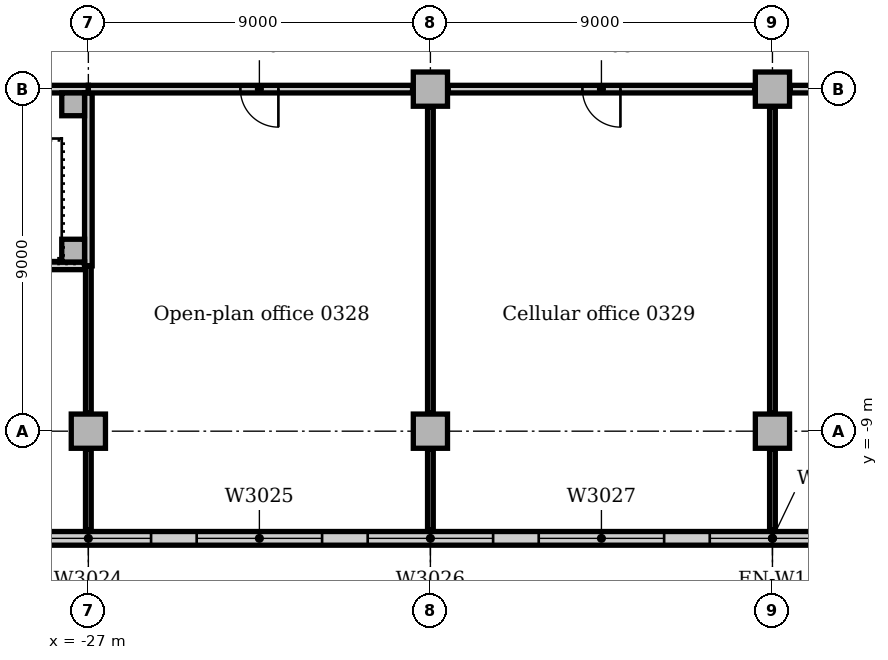
"""IFC4 building model, lengths in metres.
Left out: names, types, materials, properties, quantities, classifications, styles, units other than length and angle.
Written with IfcOpenShell. Run it as: python <this file> out.ifc"""

import sys

from ifc_helpers import new_model, si_unit, direction, frame, frame_2d, origin, origin_2d, place, context, subcontext, project, spatial, rectangle, extrude, element, fill, save


model = new_model("IFC4")
c1 = context("Model", 3, precision=1e-05, world=origin(), true_north=direction((0.0, 1.0)))
c2 = subcontext(c1, "Body", "Model", "MODEL_VIEW")
j1 = project(units=[si_unit("LENGTHUNIT", "METRE"), si_unit("PLANEANGLEUNIT", "RADIAN")], contexts=[c1])
p1 = place(None, origin())
s1 = spatial("IfcSite", under=j1, at=p1, CompositionType="ELEMENT")
p2 = place(p1, origin())
s2 = spatial("IfcBuilding", under=s1, at=p2, CompositionType="ELEMENT")
p3 = place(p2, frame((0.0, 0.0, 16.0)))
s3 = spatial("IfcBuildingStorey", under=s2, at=p3, CompositionType="ELEMENT", Elevation=16.0)
for number, where, z_axis, x_axis in (
    (1, (-27.0, -9.0, 0.0), (0.0, 0.0, 1.0), (1.0, 0.0, 0.0)),
    (2, (-18.0, -9.0, 0.0), (0.0, 0.0, 1.0), (1.0, 0.0, 0.0)),
    (3, (-18.0, 0.0, 0.0), (0.0, 0.0, 1.0), (1.0, 0.0, 0.0)),
    (4, (-9.0, -9.0, 0.0), (0.0, 0.0, 1.0), (1.0, 0.0, 0.0)),
    (5, (-9.0, 0.0, 0.0), (0.0, 0.0, 1.0), (1.0, 0.0, 0.0)),
):
    element("IfcColumn", number, at=place(p3, frame(where, z_axis=z_axis, x_axis=x_axis)), inside=s3, PredefinedType="COLUMN", context=c2, shape_type="SweptSolid", body=[
        extrude(rectangle(XDim=0.9, YDim=0.9, at=origin_2d()), origin(), (0.0, 0.0, 1.0), 4.7),
    ])
p4 = place(p3, frame((-81.0, -11.82, 0.0), z_axis=(0.0, 0.0, 1.0), x_axis=(1.0, 0.0, 0.0)))
e6 = element("IfcWall", 6, at=p4, inside=s3, PredefinedType="STANDARD", context=c2, shape_type="SweptSolid", body=[
    extrude(rectangle(XDim=144.0, YDim=0.36, at=frame_2d((72.0, 0.0))), origin(), (0.0, 0.0, 1.0), 4.7),
])
p5 = place(p4, frame((2.85, 0.0, 0.9)))
e7 = element("IfcOpeningElement", 7, at=p5, cuts=e6, PredefinedType="OPENING", context=c2, shape_type="SweptSolid", body=[
    extrude(rectangle(XDim=3.3, YDim=2.4, at=frame_2d((1.65, 1.2))), frame((0.0, 0.19, 0.0), z_axis=(0.0, -1.0, 0.0), x_axis=(1.0, 0.0, 0.0)), (0.0, 0.0, 1.0), 0.38),
])
p6 = place(p4, frame((7.35, 0.0, 0.9)))
e8 = element("IfcOpeningElement", 8, at=p6, cuts=e6, PredefinedType="OPENING", context=c2, shape_type="SweptSolid", body=[
    extrude(rectangle(XDim=3.3, YDim=2.4, at=frame_2d((1.65, 1.2))), frame((0.0, 0.19, 0.0), z_axis=(0.0, -1.0, 0.0), x_axis=(1.0, 0.0, 0.0)), (0.0, 0.0, 1.0), 0.38),
])
p7 = place(p4, frame((11.85, 0.0, 0.9)))
e9 = element("IfcOpeningElement", 9, at=p7, cuts=e6, PredefinedType="OPENING", context=c2, shape_type="SweptSolid", body=[
    extrude(rectangle(XDim=3.3, YDim=2.4, at=frame_2d((1.65, 1.2))), frame((0.0, 0.19, 0.0), z_axis=(0.0, -1.0, 0.0), x_axis=(1.0, 0.0, 0.0)), (0.0, 0.0, 1.0), 0.38),
])
p8 = place(p4, frame((16.35, 0.0, 0.9)))
e10 = element("IfcOpeningElement", 10, at=p8, cuts=e6, PredefinedType="OPENING", context=c2, shape_type="SweptSolid", body=[
    extrude(rectangle(XDim=3.3, YDim=2.4, at=frame_2d((1.65, 1.2))), frame((0.0, 0.19, 0.0), z_axis=(0.0, -1.0, 0.0), x_axis=(1.0, 0.0, 0.0)), (0.0, 0.0, 1.0), 0.38),
])
p9 = place(p4, frame((20.85, 0.0, 0.9)))
e11 = element("IfcOpeningElement", 11, at=p9, cuts=e6, PredefinedType="OPENING", context=c2, shape_type="SweptSolid", body=[
    extrude(rectangle(XDim=3.3, YDim=2.4, at=frame_2d((1.65, 1.2))), frame((0.0, 0.19, 0.0), z_axis=(0.0, -1.0, 0.0), x_axis=(1.0, 0.0, 0.0)), (0.0, 0.0, 1.0), 0.38),
])
p10 = place(p4, frame((25.35, 0.0, 0.9)))
e12 = element("IfcOpeningElement", 12, at=p10, cuts=e6, PredefinedType="OPENING", context=c2, shape_type="SweptSolid", body=[
    extrude(rectangle(XDim=3.3, YDim=2.4, at=frame_2d((1.65, 1.2))), frame((0.0, 0.19, 0.0), z_axis=(0.0, -1.0, 0.0), x_axis=(1.0, 0.0, 0.0)), (0.0, 0.0, 1.0), 0.38),
])
p11 = place(p4, frame((29.85, 0.0, 0.9)))
e13 = element("IfcOpeningElement", 13, at=p11, cuts=e6, PredefinedType="OPENING", context=c2, shape_type="SweptSolid", body=[
    extrude(rectangle(XDim=3.3, YDim=2.4, at=frame_2d((1.65, 1.2))), frame((0.0, 0.19, 0.0), z_axis=(0.0, -1.0, 0.0), x_axis=(1.0, 0.0, 0.0)), (0.0, 0.0, 1.0), 0.38),
])
p12 = place(p4, frame((34.35, 0.0, 0.9)))
e14 = element("IfcOpeningElement", 14, at=p12, cuts=e6, PredefinedType="OPENING", context=c2, shape_type="SweptSolid", body=[
    extrude(rectangle(XDim=3.3, YDim=2.4, at=frame_2d((1.65, 1.2))), frame((0.0, 0.19, 0.0), z_axis=(0.0, -1.0, 0.0), x_axis=(1.0, 0.0, 0.0)), (0.0, 0.0, 1.0), 0.38),
])
p13 = place(p4, frame((38.85, 0.0, 0.9)))
e15 = element("IfcOpeningElement", 15, at=p13, cuts=e6, PredefinedType="OPENING", context=c2, shape_type="SweptSolid", body=[
    extrude(rectangle(XDim=3.3, YDim=2.4, at=frame_2d((1.65, 1.2))), frame((0.0, 0.19, 0.0), z_axis=(0.0, -1.0, 0.0), x_axis=(1.0, 0.0, 0.0)), (0.0, 0.0, 1.0), 0.38),
])
p14 = place(p4, frame((43.35, 0.0, 0.9)))
e16 = element("IfcOpeningElement", 16, at=p14, cuts=e6, PredefinedType="OPENING", context=c2, shape_type="SweptSolid", body=[
    extrude(rectangle(XDim=3.3, YDim=2.4, at=frame_2d((1.65, 1.2))), frame((0.0, 0.19, 0.0), z_axis=(0.0, -1.0, 0.0), x_axis=(1.0, 0.0, 0.0)), (0.0, 0.0, 1.0), 0.38),
])
p15 = place(p4, frame((47.85, 0.0, 0.9)))
e17 = element("IfcOpeningElement", 17, at=p15, cuts=e6, PredefinedType="OPENING", context=c2, shape_type="SweptSolid", body=[
    extrude(rectangle(XDim=3.3, YDim=2.4, at=frame_2d((1.65, 1.2))), frame((0.0, 0.19, 0.0), z_axis=(0.0, -1.0, 0.0), x_axis=(1.0, 0.0, 0.0)), (0.0, 0.0, 1.0), 0.38),
])
p16 = place(p4, frame((52.35, 0.0, 0.9)))
e18 = element("IfcOpeningElement", 18, at=p16, cuts=e6, PredefinedType="OPENING", context=c2, shape_type="SweptSolid", body=[
    extrude(rectangle(XDim=3.3, YDim=2.4, at=frame_2d((1.65, 1.2))), frame((0.0, 0.19, 0.0), z_axis=(0.0, -1.0, 0.0), x_axis=(1.0, 0.0, 0.0)), (0.0, 0.0, 1.0), 0.38),
])
p17 = place(p4, frame((56.85, 0.0, 0.9)))
e19 = element("IfcOpeningElement", 19, at=p17, cuts=e6, PredefinedType="OPENING", context=c2, shape_type="SweptSolid", body=[
    extrude(rectangle(XDim=3.3, YDim=2.4, at=frame_2d((1.65, 1.2))), frame((0.0, 0.19, 0.0), z_axis=(0.0, -1.0, 0.0), x_axis=(1.0, 0.0, 0.0)), (0.0, 0.0, 1.0), 0.38),
])
p18 = place(p4, frame((61.35, 0.0, 0.9)))
e20 = element("IfcOpeningElement", 20, at=p18, cuts=e6, PredefinedType="OPENING", context=c2, shape_type="SweptSolid", body=[
    extrude(rectangle(XDim=3.3, YDim=2.4, at=frame_2d((1.65, 1.2))), frame((0.0, 0.19, 0.0), z_axis=(0.0, -1.0, 0.0), x_axis=(1.0, 0.0, 0.0)), (0.0, 0.0, 1.0), 0.38),
])
p19 = place(p4, frame((65.85, 0.0, 0.9)))
e21 = element("IfcOpeningElement", 21, at=p19, cuts=e6, PredefinedType="OPENING", context=c2, shape_type="SweptSolid", body=[
    extrude(rectangle(XDim=3.3, YDim=2.4, at=frame_2d((1.65, 1.2))), frame((0.0, 0.19, 0.0), z_axis=(0.0, -1.0, 0.0), x_axis=(1.0, 0.0, 0.0)), (0.0, 0.0, 1.0), 0.38),
])
p20 = place(p4, frame((70.35, 0.0, 0.9)))
e22 = element("IfcOpeningElement", 22, at=p20, cuts=e6, PredefinedType="OPENING", context=c2, shape_type="SweptSolid", body=[
    extrude(rectangle(XDim=3.3, YDim=2.4, at=frame_2d((1.65, 1.2))), frame((0.0, 0.19, 0.0), z_axis=(0.0, -1.0, 0.0), x_axis=(1.0, 0.0, 0.0)), (0.0, 0.0, 1.0), 0.38),
])
p21 = place(p4, frame((74.85, 0.0, 0.9)))
e23 = element("IfcOpeningElement", 23, at=p21, cuts=e6, PredefinedType="OPENING", context=c2, shape_type="SweptSolid", body=[
    extrude(rectangle(XDim=3.3, YDim=2.4, at=frame_2d((1.65, 1.2))), frame((0.0, 0.19, 0.0), z_axis=(0.0, -1.0, 0.0), x_axis=(1.0, 0.0, 0.0)), (0.0, 0.0, 1.0), 0.38),
])
p22 = place(p4, frame((79.35, 0.0, 0.9)))
e24 = element("IfcOpeningElement", 24, at=p22, cuts=e6, PredefinedType="OPENING", context=c2, shape_type="SweptSolid", body=[
    extrude(rectangle(XDim=3.3, YDim=2.4, at=frame_2d((1.65, 1.2))), frame((0.0, 0.19, 0.0), z_axis=(0.0, -1.0, 0.0), x_axis=(1.0, 0.0, 0.0)), (0.0, 0.0, 1.0), 0.38),
])
p23 = place(p4, frame((83.85, 0.0, 0.9)))
e25 = element("IfcOpeningElement", 25, at=p23, cuts=e6, PredefinedType="OPENING", context=c2, shape_type="SweptSolid", body=[
    extrude(rectangle(XDim=3.3, YDim=2.4, at=frame_2d((1.65, 1.2))), frame((0.0, 0.19, 0.0), z_axis=(0.0, -1.0, 0.0), x_axis=(1.0, 0.0, 0.0)), (0.0, 0.0, 1.0), 0.38),
])
p24 = place(p4, frame((88.35, 0.0, 0.9)))
e26 = element("IfcOpeningElement", 26, at=p24, cuts=e6, PredefinedType="OPENING", context=c2, shape_type="SweptSolid", body=[
    extrude(rectangle(XDim=3.3, YDim=2.4, at=frame_2d((1.65, 1.2))), frame((0.0, 0.19, 0.0), z_axis=(0.0, -1.0, 0.0), x_axis=(1.0, 0.0, 0.0)), (0.0, 0.0, 1.0), 0.38),
])
p25 = place(p4, frame((92.85, 0.0, 0.9)))
e27 = element("IfcOpeningElement", 27, at=p25, cuts=e6, PredefinedType="OPENING", context=c2, shape_type="SweptSolid", body=[
    extrude(rectangle(XDim=3.3, YDim=2.4, at=frame_2d((1.65, 1.2))), frame((0.0, 0.19, 0.0), z_axis=(0.0, -1.0, 0.0), x_axis=(1.0, 0.0, 0.0)), (0.0, 0.0, 1.0), 0.38),
])
p26 = place(p4, frame((97.35, 0.0, 0.9)))
e28 = element("IfcOpeningElement", 28, at=p26, cuts=e6, PredefinedType="OPENING", context=c2, shape_type="SweptSolid", body=[
    extrude(rectangle(XDim=3.3, YDim=2.4, at=frame_2d((1.65, 1.2))), frame((0.0, 0.19, 0.0), z_axis=(0.0, -1.0, 0.0), x_axis=(1.0, 0.0, 0.0)), (0.0, 0.0, 1.0), 0.38),
])
p27 = place(p4, frame((101.85, 0.0, 0.9)))
e29 = element("IfcOpeningElement", 29, at=p27, cuts=e6, PredefinedType="OPENING", context=c2, shape_type="SweptSolid", body=[
    extrude(rectangle(XDim=3.3, YDim=2.4, at=frame_2d((1.65, 1.2))), frame((0.0, 0.19, 0.0), z_axis=(0.0, -1.0, 0.0), x_axis=(1.0, 0.0, 0.0)), (0.0, 0.0, 1.0), 0.38),
])
p28 = place(p4, frame((106.35, 0.0, 0.9)))
e30 = element("IfcOpeningElement", 30, at=p28, cuts=e6, PredefinedType="OPENING", context=c2, shape_type="SweptSolid", body=[
    extrude(rectangle(XDim=3.3, YDim=2.4, at=frame_2d((1.65, 1.2))), frame((0.0, 0.19, 0.0), z_axis=(0.0, -1.0, 0.0), x_axis=(1.0, 0.0, 0.0)), (0.0, 0.0, 1.0), 0.38),
])
p29 = place(p4, frame((110.85, 0.0, 0.9)))
e31 = element("IfcOpeningElement", 31, at=p29, cuts=e6, PredefinedType="OPENING", context=c2, shape_type="SweptSolid", body=[
    extrude(rectangle(XDim=3.3, YDim=2.4, at=frame_2d((1.65, 1.2))), frame((0.0, 0.19, 0.0), z_axis=(0.0, -1.0, 0.0), x_axis=(1.0, 0.0, 0.0)), (0.0, 0.0, 1.0), 0.38),
])
p30 = place(p4, frame((115.35, 0.0, 0.9)))
e32 = element("IfcOpeningElement", 32, at=p30, cuts=e6, PredefinedType="OPENING", context=c2, shape_type="SweptSolid", body=[
    extrude(rectangle(XDim=3.3, YDim=2.4, at=frame_2d((1.65, 1.2))), frame((0.0, 0.19, 0.0), z_axis=(0.0, -1.0, 0.0), x_axis=(1.0, 0.0, 0.0)), (0.0, 0.0, 1.0), 0.38),
])
p31 = place(p4, frame((119.85, 0.0, 0.9)))
e33 = element("IfcOpeningElement", 33, at=p31, cuts=e6, PredefinedType="OPENING", context=c2, shape_type="SweptSolid", body=[
    extrude(rectangle(XDim=3.3, YDim=2.4, at=frame_2d((1.65, 1.2))), frame((0.0, 0.19, 0.0), z_axis=(0.0, -1.0, 0.0), x_axis=(1.0, 0.0, 0.0)), (0.0, 0.0, 1.0), 0.38),
])
p32 = place(p4, frame((124.35, 0.0, 0.9)))
e34 = element("IfcOpeningElement", 34, at=p32, cuts=e6, PredefinedType="OPENING", context=c2, shape_type="SweptSolid", body=[
    extrude(rectangle(XDim=3.3, YDim=2.4, at=frame_2d((1.65, 1.2))), frame((0.0, 0.19, 0.0), z_axis=(0.0, -1.0, 0.0), x_axis=(1.0, 0.0, 0.0)), (0.0, 0.0, 1.0), 0.38),
])
p33 = place(p4, frame((128.85, 0.0, 0.9)))
e35 = element("IfcOpeningElement", 35, at=p33, cuts=e6, PredefinedType="OPENING", context=c2, shape_type="SweptSolid", body=[
    extrude(rectangle(XDim=3.3, YDim=2.4, at=frame_2d((1.65, 1.2))), frame((0.0, 0.19, 0.0), z_axis=(0.0, -1.0, 0.0), x_axis=(1.0, 0.0, 0.0)), (0.0, 0.0, 1.0), 0.38),
])
p34 = place(p4, frame((133.35, 0.0, 0.9)))
e36 = element("IfcOpeningElement", 36, at=p34, cuts=e6, PredefinedType="OPENING", context=c2, shape_type="SweptSolid", body=[
    extrude(rectangle(XDim=3.3, YDim=2.4, at=frame_2d((1.65, 1.2))), frame((0.0, 0.19, 0.0), z_axis=(0.0, -1.0, 0.0), x_axis=(1.0, 0.0, 0.0)), (0.0, 0.0, 1.0), 0.38),
])
p35 = place(p4, frame((137.85, 0.0, 0.9)))
e37 = element("IfcOpeningElement", 37, at=p35, cuts=e6, PredefinedType="OPENING", context=c2, shape_type="SweptSolid", body=[
    extrude(rectangle(XDim=3.3, YDim=2.4, at=frame_2d((1.65, 1.2))), frame((0.0, 0.19, 0.0), z_axis=(0.0, -1.0, 0.0), x_axis=(1.0, 0.0, 0.0)), (0.0, 0.0, 1.0), 0.38),
])
for number, where, z_axis, x_axis in (
    (38, (-27.4, -4.25, 0.0), (0.0, 0.0, 1.0), (1.0, 0.0, 0.0)),
    (39, (-27.4, -0.4, 0.0), (0.0, 0.0, 1.0), (1.0, 0.0, 0.0)),
):
    element("IfcColumn", number, at=place(p3, frame(where, z_axis=z_axis, x_axis=x_axis)), inside=s3, PredefinedType="COLUMN", context=c2, shape_type="SweptSolid", body=[
        extrude(rectangle(XDim=0.6, YDim=0.6, at=origin_2d()), origin(), (0.0, 0.0, 1.0), 5.0),
    ])
p36 = place(p3, frame((-36.0, 0.0, 0.0), z_axis=(0.0, 0.0, 1.0), x_axis=(1.0, 0.0, 0.0)))
e40 = element("IfcWall", 40, at=p36, inside=s3, PredefinedType="SOLIDWALL", context=c2, shape_type="SweptSolid", body=[
    extrude(rectangle(XDim=9.0, YDim=0.2, at=frame_2d((4.5, 0.0))), origin(), (0.0, 0.0, 1.0), 4.7),
])
p37 = place(p36, frame((0.8, 0.0, 0.0)))
e41 = element("IfcOpeningElement", 41, at=p37, cuts=e40, PredefinedType="OPENING", context=c2, shape_type="SweptSolid", body=[
    extrude(rectangle(XDim=1.2, YDim=2.1, at=frame_2d((0.6, 1.05))), frame((0.0, 0.11, 0.0), z_axis=(0.0, -1.0, 0.0), x_axis=(1.0, 0.0, 0.0)), (0.0, 0.0, 1.0), 0.22),
])
p38 = place(p3, frame((-27.0, -4.65, 0.0), z_axis=(0.0, 0.0, 1.0), x_axis=(0.0, 1.0, 0.0)))
e42 = element("IfcWall", 42, at=p38, inside=s3, PredefinedType="SOLIDWALL", context=c2, shape_type="SweptSolid", body=[
    extrude(rectangle(XDim=4.55, YDim=0.2, at=frame_2d((2.275, 0.0))), origin(), (0.0, 0.0, 1.0), 4.7),
])
p39 = place(p3, frame((-36.1, -4.65, 0.0), z_axis=(0.0, 0.0, 1.0), x_axis=(1.0, 0.0, 0.0)))
e43 = element("IfcWall", 43, at=p39, inside=s3, PredefinedType="SOLIDWALL", context=c2, shape_type="SweptSolid", body=[
    extrude(rectangle(XDim=9.0, YDim=0.2, at=frame_2d((4.5, 0.0))), origin(), (0.0, 0.0, 1.0), 4.7),
])
p40 = place(p3, frame((-27.0, 0.0, 0.0), z_axis=(0.0, 0.0, 1.0), x_axis=(1.0, 0.0, 0.0)))
e44 = element("IfcWall", 44, at=p40, inside=s3, PredefinedType="PARTITIONING", context=c2, shape_type="SweptSolid", body=[
    extrude(rectangle(XDim=8.53, YDim=0.2, at=frame_2d((4.265, 0.0))), origin(), (0.0, 0.0, 1.0), 4.7),
])
p41 = place(p40, frame((4.0, 0.0, 0.0)))
e45 = element("IfcOpeningElement", 45, at=p41, cuts=e44, PredefinedType="OPENING", context=c2, shape_type="SweptSolid", body=[
    extrude(rectangle(XDim=1.0, YDim=2.1, at=frame_2d((0.5, 1.05))), frame((0.0, 0.11, 0.0), z_axis=(0.0, -1.0, 0.0), x_axis=(1.0, 0.0, 0.0)), (0.0, 0.0, 1.0), 0.22),
])
p42 = place(p3, frame((-17.53, 0.0, 0.0), z_axis=(0.0, 0.0, 1.0), x_axis=(1.0, 0.0, 0.0)))
e46 = element("IfcWall", 46, at=p42, inside=s3, PredefinedType="PARTITIONING", context=c2, shape_type="SweptSolid", body=[
    extrude(rectangle(XDim=8.06, YDim=0.2, at=frame_2d((4.03, 0.0))), origin(), (0.0, 0.0, 1.0), 4.7),
])
p43 = place(p42, frame((3.53, 0.0, 0.0)))
e47 = element("IfcOpeningElement", 47, at=p43, cuts=e46, PredefinedType="OPENING", context=c2, shape_type="SweptSolid", body=[
    extrude(rectangle(XDim=1.0, YDim=2.1, at=frame_2d((0.5, 1.05))), frame((0.0, 0.11, 0.0), z_axis=(0.0, -1.0, 0.0), x_axis=(1.0, 0.0, 0.0)), (0.0, 0.0, 1.0), 0.22),
])
p44 = place(p3, frame((-8.53, 0.0, 0.0), z_axis=(0.0, 0.0, 1.0), x_axis=(1.0, 0.0, 0.0)))
e48 = element("IfcWall", 48, at=p44, inside=s3, PredefinedType="PARTITIONING", context=c2, shape_type="SweptSolid", body=[
    extrude(rectangle(XDim=8.53, YDim=0.2, at=frame_2d((4.265, 0.0))), origin(), (0.0, 0.0, 1.0), 4.7),
])
p45 = place(p44, frame((3.53, 0.0, 0.0)))
e49 = element("IfcOpeningElement", 49, at=p45, cuts=e48, PredefinedType="OPENING", context=c2, shape_type="SweptSolid", body=[
    extrude(rectangle(XDim=1.0, YDim=2.1, at=frame_2d((0.5, 1.05))), frame((0.0, 0.11, 0.0), z_axis=(0.0, -1.0, 0.0), x_axis=(1.0, 0.0, 0.0)), (0.0, 0.0, 1.0), 0.22),
])
p46 = place(p3, frame((-18.0, -11.6, 0.0), z_axis=(0.0, 0.0, 1.0), x_axis=(0.0, 1.0, 0.0)))
e50 = element("IfcWall", 50, at=p46, inside=s3, PredefinedType="PARTITIONING", context=c2, shape_type="SweptSolid", body=[
    extrude(rectangle(XDim=2.13, YDim=0.15, at=frame_2d((1.065, 0.0))), origin(), (0.0, 0.0, 1.0), 4.7),
])
p47 = place(p3, frame((-18.0, -8.53, 0.0), z_axis=(0.0, 0.0, 1.0), x_axis=(0.0, 1.0, 0.0)))
e51 = element("IfcWall", 51, at=p47, inside=s3, PredefinedType="PARTITIONING", context=c2, shape_type="SweptSolid", body=[
    extrude(rectangle(XDim=8.06, YDim=0.15, at=frame_2d((4.03, 0.0))), origin(), (0.0, 0.0, 1.0), 4.7),
])
p48 = place(p3, frame((-27.0, -11.6, 0.0), z_axis=(0.0, 0.0, 1.0), x_axis=(0.0, 1.0, 0.0)))
e52 = element("IfcWall", 52, at=p48, inside=s3, PredefinedType="PARTITIONING", context=c2, shape_type="SweptSolid", body=[
    extrude(rectangle(XDim=2.13, YDim=0.15, at=frame_2d((1.065, 0.0))), origin(), (0.0, 0.0, 1.0), 4.7),
])
p49 = place(p3, frame((-27.0, -8.53, 0.0), z_axis=(0.0, 0.0, 1.0), x_axis=(0.0, 1.0, 0.0)))
e53 = element("IfcWall", 53, at=p49, inside=s3, PredefinedType="PARTITIONING", context=c2, shape_type="SweptSolid", body=[
    extrude(rectangle(XDim=3.88, YDim=0.15, at=frame_2d((1.94, 0.0))), origin(), (0.0, 0.0, 1.0), 4.7),
])
p50 = place(p3, frame((-9.0, -11.6, 0.0), z_axis=(0.0, 0.0, 1.0), x_axis=(0.0, 1.0, 0.0)))
e54 = element("IfcWall", 54, at=p50, inside=s3, PredefinedType="PARTITIONING", context=c2, shape_type="SweptSolid", body=[
    extrude(rectangle(XDim=2.13, YDim=0.15, at=frame_2d((1.065, 0.0))), origin(), (0.0, 0.0, 1.0), 4.7),
])
p51 = place(p3, frame((-9.0, -8.53, 0.0), z_axis=(0.0, 0.0, 1.0), x_axis=(0.0, 1.0, 0.0)))
e55 = element("IfcWall", 55, at=p51, inside=s3, PredefinedType="PARTITIONING", context=c2, shape_type="SweptSolid", body=[
    extrude(rectangle(XDim=8.06, YDim=0.15, at=frame_2d((4.03, 0.0))), origin(), (0.0, 0.0, 1.0), 4.7),
])
p52 = place(p16, origin())
e56 = element("IfcWindow", 56, at=p52, inside=s3, PartitioningType="SINGLE_PANEL", PredefinedType="WINDOW", context=c2, shape_type="SweptSolid", body=[
    extrude(rectangle(XDim=3.3, YDim=2.4, at=frame_2d((1.65, 1.2))), frame((0.0, 0.13, 0.0), z_axis=(0.0, -1.0, 0.0), x_axis=(1.0, 0.0, 0.0)), (0.0, 0.0, 1.0), 0.06),
])
fill(e18, e56)
p53 = place(p17, origin())
e57 = element("IfcWindow", 57, at=p53, inside=s3, PartitioningType="SINGLE_PANEL", PredefinedType="WINDOW", context=c2, shape_type="SweptSolid", body=[
    extrude(rectangle(XDim=3.3, YDim=2.4, at=frame_2d((1.65, 1.2))), frame((0.0, 0.13, 0.0), z_axis=(0.0, -1.0, 0.0), x_axis=(1.0, 0.0, 0.0)), (0.0, 0.0, 1.0), 0.06),
])
fill(e19, e57)
p54 = place(p18, origin())
e58 = element("IfcWindow", 58, at=p54, inside=s3, PartitioningType="SINGLE_PANEL", PredefinedType="WINDOW", context=c2, shape_type="SweptSolid", body=[
    extrude(rectangle(XDim=3.3, YDim=2.4, at=frame_2d((1.65, 1.2))), frame((0.0, 0.13, 0.0), z_axis=(0.0, -1.0, 0.0), x_axis=(1.0, 0.0, 0.0)), (0.0, 0.0, 1.0), 0.06),
])
fill(e20, e58)
p55 = place(p19, origin())
e59 = element("IfcWindow", 59, at=p55, inside=s3, PartitioningType="SINGLE_PANEL", PredefinedType="WINDOW", context=c2, shape_type="SweptSolid", body=[
    extrude(rectangle(XDim=3.3, YDim=2.4, at=frame_2d((1.65, 1.2))), frame((0.0, 0.13, 0.0), z_axis=(0.0, -1.0, 0.0), x_axis=(1.0, 0.0, 0.0)), (0.0, 0.0, 1.0), 0.06),
])
fill(e21, e59)
p56 = place(p20, origin())
e60 = element("IfcWindow", 60, at=p56, inside=s3, PartitioningType="SINGLE_PANEL", PredefinedType="WINDOW", context=c2, shape_type="SweptSolid", body=[
    extrude(rectangle(XDim=3.3, YDim=2.4, at=frame_2d((1.65, 1.2))), frame((0.0, 0.13, 0.0), z_axis=(0.0, -1.0, 0.0), x_axis=(1.0, 0.0, 0.0)), (0.0, 0.0, 1.0), 0.06),
])
fill(e22, e60)
p57 = place(p41, frame((1.0, 0.0, 0.0), z_axis=(0.0, 0.0, 1.0), x_axis=(-1.0, 0.0, 0.0)))
e61 = element("IfcDoor", 61, at=p57, inside=s3, OperationType="SINGLE_SWING_LEFT", PredefinedType="DOOR", context=c2, shape_type="SweptSolid", body=[
    extrude(rectangle(XDim=1.0, YDim=2.1, at=frame_2d((0.5, 1.05))), frame((0.0, 0.025, 0.0), z_axis=(0.0, -1.0, 0.0), x_axis=(1.0, 0.0, 0.0)), (0.0, 0.0, 1.0), 0.05),
])
fill(e45, e61)
p58 = place(p43, frame((1.0, 0.0, 0.0), z_axis=(0.0, 0.0, 1.0), x_axis=(-1.0, 0.0, 0.0)))
e62 = element("IfcDoor", 62, at=p58, inside=s3, OperationType="SINGLE_SWING_LEFT", PredefinedType="DOOR", context=c2, shape_type="SweptSolid", body=[
    extrude(rectangle(XDim=1.0, YDim=2.1, at=frame_2d((0.5, 1.05))), frame((0.0, 0.025, 0.0), z_axis=(0.0, -1.0, 0.0), x_axis=(1.0, 0.0, 0.0)), (0.0, 0.0, 1.0), 0.05),
])
fill(e47, e62)
save(model, sys.argv[1])
